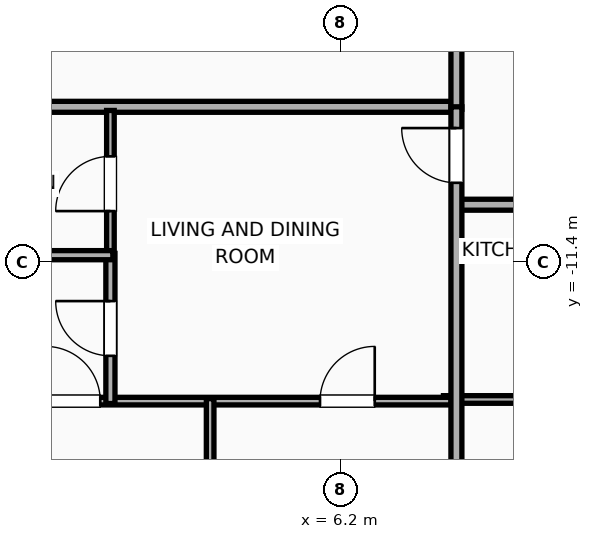
"""IFC4 building model, lengths in metres.
Left out: names, types, materials, properties, quantities, classifications, styles, units other than length and angle.
Written with IfcOpenShell. Run it as: python <this file> out.ifc"""

import sys

from ifc_helpers import new_model, si_unit, direction, frame, frame_2d, origin, place, context, subcontext, project, spatial, rectangle, extrude, element, fill, save


model = new_model("IFC4")
c1 = context("Model", 3, precision=1e-05, world=origin(), true_north=direction((0.0, 1.0)))
c2 = subcontext(c1, "Body", "Model", "MODEL_VIEW")
j1 = project(units=[si_unit("LENGTHUNIT", "METRE"), si_unit("PLANEANGLEUNIT", "RADIAN")], contexts=[c1])
p1 = place(None, origin())
s1 = spatial("IfcSite", under=j1, at=p1, CompositionType="ELEMENT")
p2 = place(p1, origin())
s2 = spatial("IfcBuilding", under=s1, at=p2, CompositionType="ELEMENT")
p3 = place(p2, frame((0.0, 0.0, 302.9)))
s3 = spatial("IfcBuildingStorey", under=s2, at=p3, CompositionType="ELEMENT", Elevation=302.9)
p4 = place(p3, frame((-8.15, -8.84, 0.0), z_axis=(0.0, 0.0, 1.0), x_axis=(1.0, 0.0, 0.0)))
e1 = element("IfcWall", 1, at=p4, inside=s3, PredefinedType="PARTITIONING", context=c2, shape_type="SweptSolid", body=[
    extrude(rectangle(XDim=16.3, YDim=0.18, at=frame_2d((8.15, 0.0))), origin(), (0.0, 0.0, 1.0), 3.635),
])
p5 = place(p3, frame((8.1, -8.88, 0.0), z_axis=(0.0, 0.0, 1.0), x_axis=(0.0, 1.0, 0.0)))
e2 = element("IfcWall", 2, at=p5, inside=s3, PredefinedType="PARTITIONING", context=c2, shape_type="SweptSolid", body=[
    extrude(rectangle(XDim=17.76, YDim=0.18, at=frame_2d((8.88, 0.0))), origin(), (0.0, 0.0, 1.0), 3.635),
])
p6 = place(p3, frame((7.887, -13.653, 0.0), z_axis=(0.0, 0.0, 1.0), x_axis=(1.0, 0.0, 0.0)))
e3 = element("IfcWall", 3, at=p6, inside=s3, PredefinedType="PARTITIONING", context=c2, shape_type="SweptSolid", body=[
    extrude(rectangle(XDim=2.623, YDim=0.125, at=frame_2d((1.311, 0.0))), origin(), (0.0, 0.0, 1.0), 3.635),
])
p7 = place(p3, frame((8.08, -10.45, 0.0), z_axis=(0.0, 0.0, 1.0), x_axis=(1.0, 0.0, 0.0)))
e4 = element("IfcWall", 4, at=p7, inside=s3, PredefinedType="PARTITIONING", context=c2, shape_type="SweptSolid", body=[
    extrude(rectangle(XDim=15.199, YDim=0.18, at=frame_2d((7.6, 0.0))), origin(), (0.0, 0.0, 1.0), 3.635),
])
p8 = place(p7, frame((3.39, 0.0, 0.0)))
e5 = element("IfcOpeningElement", 5, at=p8, cuts=e4, PredefinedType="OPENING", context=c2, shape_type="SweptSolid", body=[
    extrude(rectangle(XDim=1.15, YDim=2.05, at=frame_2d((0.575, 1.025))), frame((0.0, 0.1, 0.0), z_axis=(0.0, -1.0, 0.0), x_axis=(1.0, 0.0, 0.0)), (0.0, 0.0, 1.0), 0.2),
])
p9 = place(p7, frame((11.134, 0.0, 0.0)))
e6 = element("IfcOpeningElement", 6, at=p9, cuts=e4, PredefinedType="OPENING", context=c2, shape_type="SweptSolid", body=[
    extrude(rectangle(XDim=0.9, YDim=2.05, at=frame_2d((0.45, 1.025))), frame((0.0, 0.1, 0.0), z_axis=(0.0, -1.0, 0.0), x_axis=(1.0, 0.0, 0.0)), (0.0, 0.0, 1.0), 0.2),
])
p10 = place(p3, frame((0.02, -13.68, 0.0), z_axis=(0.0, 0.0, 1.0), x_axis=(1.0, 0.0, 0.0)))
e7 = element("IfcWall", 7, at=p10, inside=s3, PredefinedType="PARTITIONING", context=c2, shape_type="SweptSolid", body=[
    extrude(rectangle(XDim=7.992, YDim=0.125, at=frame_2d((3.996, 0.0))), origin(), (0.0, 0.0, 1.0), 3.635),
])
p11 = place(p10, frame((1.323, 0.0, 0.0)))
e8 = element("IfcOpeningElement", 8, at=p11, cuts=e7, PredefinedType="OPENING", context=c2, shape_type="SweptSolid", body=[
    extrude(rectangle(XDim=0.9, YDim=2.05, at=frame_2d((0.45, 1.025))), frame((0.0, 0.073, 0.0), z_axis=(0.0, -1.0, 0.0), x_axis=(1.0, 0.0, 0.0)), (0.0, 0.0, 1.0), 0.145),
])
p12 = place(p10, frame((5.837, 0.0, 0.0)))
e9 = element("IfcOpeningElement", 9, at=p12, cuts=e7, PredefinedType="OPENING", context=c2, shape_type="SweptSolid", body=[
    extrude(rectangle(XDim=0.9, YDim=2.05, at=frame_2d((0.45, 1.025))), frame((0.0, 0.073, 0.0), z_axis=(0.0, -1.0, 0.0), x_axis=(1.0, 0.0, 0.0)), (0.0, 0.0, 1.0), 0.145),
])
p13 = place(p3, frame((2.41, -11.31, 0.0), z_axis=(0.0, 0.0, 1.0), x_axis=(0.0, 1.0, 0.0)))
e10 = element("IfcWall", 10, at=p13, inside=s3, PredefinedType="PARTITIONING", context=c2, shape_type="SweptSolid", body=[
    extrude(rectangle(XDim=2.41, YDim=0.125, at=frame_2d((1.205, 0.0))), origin(), (0.0, 0.0, 1.0), 3.635),
])
p14 = place(p13, frame((0.755, 0.0, 0.0)))
e11 = element("IfcOpeningElement", 11, at=p14, cuts=e10, PredefinedType="OPENING", context=c2, shape_type="SweptSolid", body=[
    extrude(rectangle(XDim=0.9, YDim=2.05, at=frame_2d((0.45, 1.025))), frame((0.0, 0.073, 0.0), z_axis=(0.0, -1.0, 0.0), x_axis=(1.0, 0.0, 0.0)), (0.0, 0.0, 1.0), 0.145),
])
p15 = place(p3, frame((2.41, -13.72, 0.0), z_axis=(0.0, 0.0, 1.0), x_axis=(0.0, 1.0, 0.0)))
e12 = element("IfcWall", 12, at=p15, inside=s3, PredefinedType="PLUMBINGWALL", context=c2, shape_type="SweptSolid", body=[
    extrude(rectangle(XDim=2.47, YDim=0.15, at=frame_2d((1.235, 0.0))), origin(), (0.0, 0.0, 1.0), 3.075),
])
p16 = place(p15, frame((0.785, 0.0, 0.0)))
e13 = element("IfcOpeningElement", 13, at=p16, cuts=e12, PredefinedType="OPENING", context=c2, shape_type="SweptSolid", body=[
    extrude(rectangle(XDim=0.9, YDim=2.05, at=frame_2d((0.45, 1.025))), frame((0.0, 0.085, 0.0), z_axis=(0.0, -1.0, 0.0), x_axis=(1.0, 0.0, 0.0)), (0.0, 0.0, 1.0), 0.17),
])
p17 = place(p3, frame((0.02, -11.28, 0.0), z_axis=(0.0, 0.0, 1.0), x_axis=(1.0, 0.0, 0.0)))
e14 = element("IfcWall", 14, at=p17, inside=s3, PredefinedType="PLUMBINGWALL", context=c2, shape_type="SweptSolid", body=[
    extrude(rectangle(XDim=2.43, YDim=0.15, at=frame_2d((1.215, 0.0))), origin(), (0.0, 0.0, 1.0), 3.635),
])
p18 = place(p3, frame((4.05, -19.432, 0.0), z_axis=(0.0, 0.0, 1.0), x_axis=(0.0, 1.0, 0.0)))
e15 = element("IfcWall", 15, at=p18, inside=s3, PredefinedType="PARTITIONING", context=c2, shape_type="SweptSolid", body=[
    extrude(rectangle(XDim=5.792, YDim=0.125, at=frame_2d((2.896, 0.0))), origin(), (0.0, 0.0, 1.0), 3.635),
])
p19 = place(p3, frame((8.1, -19.857, 0.0), z_axis=(0.0, 0.0, 1.0), x_axis=(0.0, 1.0, 0.0)))
e16 = element("IfcWall", 16, at=p19, inside=s3, PredefinedType="PARTITIONING", context=c2, shape_type="SweptSolid", body=[
    extrude(rectangle(XDim=11.017, YDim=0.18, at=frame_2d((5.509, 0.0))), origin(), (0.0, 0.0, 1.0), 3.635),
])
p20 = place(p19, frame((9.767, 0.0, 0.0)))
e17 = element("IfcOpeningElement", 17, at=p20, cuts=e16, PredefinedType="OPENING", context=c2, shape_type="SweptSolid", body=[
    extrude(rectangle(XDim=0.9, YDim=2.05, at=frame_2d((0.45, 1.025))), frame((0.0, 0.1, 0.0), z_axis=(0.0, -1.0, 0.0), x_axis=(1.0, 0.0, 0.0)), (0.0, 0.0, 1.0), 0.2),
])
p21 = place(p11, origin())
e18 = element("IfcDoor", 18, at=p21, inside=s3, OperationType="SINGLE_SWING_LEFT", PredefinedType="DOOR", context=c2, shape_type="SweptSolid", body=[
    extrude(rectangle(XDim=0.9, YDim=2.05, at=frame_2d((0.45, 1.025))), frame((0.0, 0.025, 0.0), z_axis=(0.0, -1.0, 0.0), x_axis=(1.0, 0.0, 0.0)), (0.0, 0.0, 1.0), 0.05),
])
fill(e8, e18)
p22 = place(p12, origin())
e19 = element("IfcDoor", 19, at=p22, inside=s3, OperationType="SINGLE_SWING_RIGHT", PredefinedType="DOOR", context=c2, shape_type="SweptSolid", body=[
    extrude(rectangle(XDim=0.9, YDim=2.05, at=frame_2d((0.45, 1.025))), frame((0.0, 0.025, 0.0), z_axis=(0.0, -1.0, 0.0), x_axis=(1.0, 0.0, 0.0)), (0.0, 0.0, 1.0), 0.05),
])
fill(e9, e19)
p23 = place(p14, origin())
e20 = element("IfcDoor", 20, at=p23, inside=s3, OperationType="SINGLE_SWING_LEFT", PredefinedType="DOOR", context=c2, shape_type="SweptSolid", body=[
    extrude(rectangle(XDim=0.9, YDim=2.05, at=frame_2d((0.45, 1.025))), frame((0.0, 0.025, 0.0), z_axis=(0.0, -1.0, 0.0), x_axis=(1.0, 0.0, 0.0)), (0.0, 0.0, 1.0), 0.05),
])
fill(e11, e20)
p24 = place(p16, origin())
e21 = element("IfcDoor", 21, at=p24, inside=s3, OperationType="SINGLE_SWING_RIGHT", PredefinedType="DOOR", context=c2, shape_type="SweptSolid", body=[
    extrude(rectangle(XDim=0.9, YDim=2.05, at=frame_2d((0.45, 1.025))), frame((0.0, 0.025, 0.0), z_axis=(0.0, -1.0, 0.0), x_axis=(1.0, 0.0, 0.0)), (0.0, 0.0, 1.0), 0.05),
])
fill(e13, e21)
p25 = place(p20, origin())
e22 = element("IfcDoor", 22, at=p25, inside=s3, OperationType="SINGLE_SWING_RIGHT", PredefinedType="DOOR", context=c2, shape_type="SweptSolid", body=[
    extrude(rectangle(XDim=0.9, YDim=2.05, at=frame_2d((0.45, 1.025))), frame((0.0, 0.025, 0.0), z_axis=(0.0, -1.0, 0.0), x_axis=(1.0, 0.0, 0.0)), (0.0, 0.0, 1.0), 0.05),
])
fill(e17, e22)
save(model, sys.argv[1])
